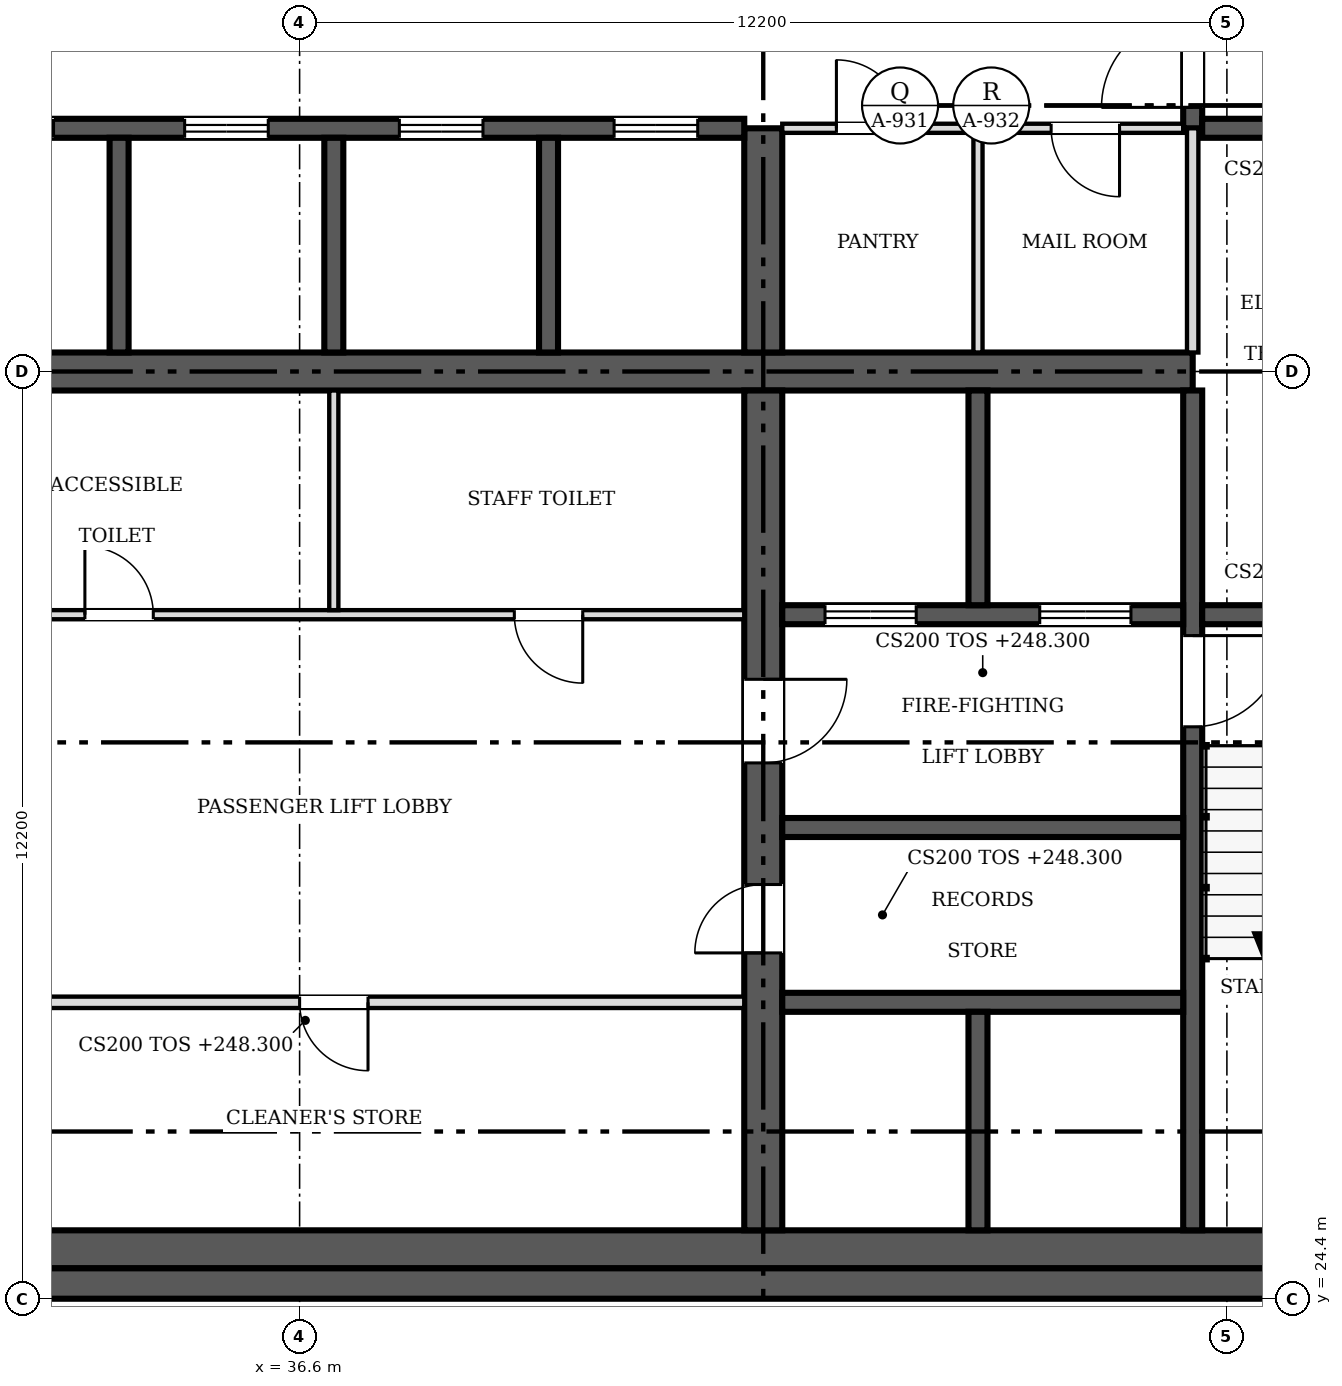
"""IFC4 building model, lengths in metres.
Left out: names, types, materials, properties, quantities, classifications, styles, units other than length and angle.
Written with IfcOpenShell. Run it as: python <this file> out.ifc"""

import sys

from ifc_helpers import new_model, si_unit, direction, frame, frame_2d, origin, place, context, subcontext, project, spatial, rectangle, extrude, source, transform, mapped, element, fill, save


model = new_model("IFC4")
c1 = context("Model", 3, precision=1e-05, world=origin(), true_north=direction((0.0, 1.0)))
c2 = subcontext(c1, "Body", "Model", "MODEL_VIEW")
j1 = project(units=[si_unit("LENGTHUNIT", "METRE"), si_unit("PLANEANGLEUNIT", "RADIAN")], contexts=[c1])
p1 = place(None, origin())
s1 = spatial("IfcSite", under=j1, at=p1, CompositionType="ELEMENT")
p2 = place(p1, origin())
s2 = spatial("IfcBuilding", under=s1, at=p2, CompositionType="ELEMENT")
p3 = place(p2, frame((0.0, 0.0, 248.3)))
s3 = spatial("IfcBuildingStorey", under=s2, at=p3, CompositionType="ELEMENT", Elevation=248.3)
p4 = place(p3, frame((54.9, 24.6, 0.0), z_axis=(0.0, 0.0, 1.0), x_axis=(-1.0, 0.0, 0.0)))
e1 = element("IfcWall", 1, at=p4, inside=s3, PredefinedType="SHEAR", context=c2, shape_type="SweptSolid", body=[
    extrude(rectangle(XDim=24.4, YDim=0.4, at=frame_2d((12.2, 0.0))), origin(), (0.0, 0.0, 1.0), 3.8),
])
m1 = source(origin(), c2, "Body", "SweptSolid", [
    extrude(rectangle(XDim=1.2, YDim=2.1, at=frame_2d((0.6, 1.05))), frame((0.0, 0.21, 0.0), z_axis=(0.0, -1.0, 0.0), x_axis=(1.0, 0.0, 0.0)), (0.0, 0.0, 1.0), 0.42),
])
p5 = place(p4, frame((1.5, 0.0, 0.0)))
e2 = element("IfcOpeningElement", 2, at=p5, cuts=e1, PredefinedType="OPENING", context=c2, shape_type="MappedRepresentation", body=[
    mapped(m1, transform((0.0, 0.0, 0.0), scale=1.0)),
])
p6 = place(p3, frame((30.9, 25.05, 0.0), z_axis=(0.0, 0.0, 1.0), x_axis=(1.0, 0.0, 0.0)))
e3 = element("IfcWall", 3, at=p6, inside=s3, PredefinedType="SOLIDWALL", context=c2, shape_type="SweptSolid", body=[
    extrude(rectangle(XDim=21.3, YDim=0.5, at=frame_2d((10.65, 0.0))), origin(), (0.0, 0.0, 1.0), 3.8),
])
p7 = place(p3, frame((31.4, 36.6, 0.0), z_axis=(0.0, 0.0, 1.0), x_axis=(1.0, 0.0, 0.0)))
e4 = element("IfcWall", 4, at=p7, inside=s3, PredefinedType="SHEAR", context=c2, shape_type="SweptSolid", body=[
    extrude(rectangle(XDim=16.95, YDim=0.5, at=frame_2d((8.475, 0.0))), origin(), (0.0, 0.0, 1.0), 3.8),
])
p8 = place(p3, frame((42.7, 36.35, 0.0), z_axis=(0.0, 0.0, 1.0), x_axis=(0.0, -1.0, 0.0)))
e5 = element("IfcWall", 5, at=p8, inside=s3, PredefinedType="SHEAR", context=c2, shape_type="SweptSolid", body=[
    extrude(rectangle(XDim=11.05, YDim=0.5, at=frame_2d((5.525, 0.0))), origin(), (0.0, 0.0, 1.0), 3.8),
])
m2 = source(origin(), c2, "Body", "SweptSolid", [
    extrude(rectangle(XDim=0.9, YDim=2.1, at=frame_2d((0.45, 1.05))), frame((0.0, 0.26, 0.0), z_axis=(0.0, -1.0, 0.0), x_axis=(1.0, 0.0, 0.0)), (0.0, 0.0, 1.0), 0.52),
])
p9 = place(p8, frame((6.5, 0.0, 0.0)))
e6 = element("IfcOpeningElement", 6, at=p9, cuts=e5, PredefinedType="OPENING", context=c2, shape_type="MappedRepresentation", body=[
    mapped(m2, transform((0.0, 0.0, 0.0), scale=1.0)),
])
m3 = source(origin(), c2, "Body", "SweptSolid", [
    extrude(rectangle(XDim=1.1, YDim=2.1, at=frame_2d((0.55, 1.05))), frame((0.0, 0.26, 0.0), z_axis=(0.0, -1.0, 0.0), x_axis=(1.0, 0.0, 0.0)), (0.0, 0.0, 1.0), 0.52),
])
p10 = place(p8, frame((3.8, 0.0, 0.0)))
e7 = element("IfcOpeningElement", 7, at=p10, cuts=e5, PredefinedType="OPENING", context=c2, shape_type="MappedRepresentation", body=[
    mapped(m3, transform((0.0, 0.0, 0.0), scale=1.0)),
])
p11 = place(p3, frame((42.7, 36.85, 0.0), z_axis=(0.0, 0.0, 1.0), x_axis=(0.0, 1.0, 0.0)))
e8 = element("IfcWall", 8, at=p11, inside=s3, PredefinedType="SHEAR", context=c2, shape_type="SweptSolid", body=[
    extrude(rectangle(XDim=2.95, YDim=0.5, at=frame_2d((1.475, 0.0))), origin(), (0.0, 0.0, 1.0), 3.8),
])
p12 = place(p3, frame((31.4, 39.8, 0.0), z_axis=(0.0, 0.0, 1.0), x_axis=(1.0, 0.0, 0.0)))
e9 = element("IfcWall", 9, at=p12, inside=s3, PredefinedType="SOLIDWALL", context=c2, shape_type="SweptSolid", body=[
    extrude(rectangle(XDim=11.05, YDim=0.25, at=frame_2d((5.525, 0.0))), origin(), (0.0, 0.0, 1.0), 3.8),
])
m4 = source(origin(), c2, "Body", "SweptSolid", [
    extrude(rectangle(XDim=1.1, YDim=2.1, at=frame_2d((0.55, 1.05))), frame((0.0, 0.135, 0.0), z_axis=(0.0, -1.0, 0.0), x_axis=(1.0, 0.0, 0.0)), (0.0, 0.0, 1.0), 0.27),
])
p13 = place(p12, frame((0.863, 0.0, 0.0)))
e10 = element("IfcOpeningElement", 10, at=p13, cuts=e9, PredefinedType="OPENING", context=c2, shape_type="MappedRepresentation", body=[
    mapped(m4, transform((0.0, 0.0, 0.0), scale=1.0)),
])
p14 = place(p12, frame((3.688, 0.0, 0.0)))
e11 = element("IfcOpeningElement", 11, at=p14, cuts=e9, PredefinedType="OPENING", context=c2, shape_type="MappedRepresentation", body=[
    mapped(m4, transform((0.0, 0.0, 0.0), scale=1.0)),
])
p15 = place(p12, frame((6.512, 0.0, 0.0)))
e12 = element("IfcOpeningElement", 12, at=p15, cuts=e9, PredefinedType="OPENING", context=c2, shape_type="MappedRepresentation", body=[
    mapped(m4, transform((0.0, 0.0, 0.0), scale=1.0)),
])
p16 = place(p12, frame((9.337, 0.0, 0.0)))
e13 = element("IfcOpeningElement", 13, at=p16, cuts=e9, PredefinedType="OPENING", context=c2, shape_type="MappedRepresentation", body=[
    mapped(m4, transform((0.0, 0.0, 0.0), scale=1.0)),
])
p17 = place(p3, frame((48.35, 36.35, 0.0), z_axis=(0.0, 0.0, 1.0), x_axis=(0.0, -1.0, 0.0)))
e14 = element("IfcWall", 14, at=p17, inside=s3, PredefinedType="SOLIDWALL", context=c2, shape_type="SweptSolid", body=[
    extrude(rectangle(XDim=11.05, YDim=0.25, at=frame_2d((5.525, 0.0))), origin(), (0.0, 0.0, 1.0), 3.8),
])
m5 = source(origin(), c2, "Body", "SweptSolid", [
    extrude(rectangle(XDim=1.2, YDim=2.1, at=frame_2d((0.6, 1.05))), frame((0.0, 0.135, 0.0), z_axis=(0.0, -1.0, 0.0), x_axis=(1.0, 0.0, 0.0)), (0.0, 0.0, 1.0), 0.27),
])
p18 = place(p17, frame((3.225, 0.0, 0.0)))
e15 = element("IfcOpeningElement", 15, at=p18, cuts=e14, PredefinedType="OPENING", context=c2, shape_type="MappedRepresentation", body=[
    mapped(m5, transform((0.0, 0.0, 0.0), scale=1.0)),
])
p19 = place(p3, frame((48.225, 33.4, 0.0), z_axis=(0.0, 0.0, 1.0), x_axis=(-1.0, 0.0, 0.0)))
e16 = element("IfcWall", 16, at=p19, inside=s3, PredefinedType="SOLIDWALL", context=c2, shape_type="SweptSolid", body=[
    extrude(rectangle(XDim=5.275, YDim=0.25, at=frame_2d((2.638, 0.0))), origin(), (0.0, 0.0, 1.0), 3.8),
])
p20 = place(p19, frame((3.512, 0.0, 0.0)))
e17 = element("IfcOpeningElement", 17, at=p20, cuts=e16, PredefinedType="OPENING", context=c2, shape_type="MappedRepresentation", body=[
    mapped(m5, transform((0.0, 0.0, 0.0), scale=1.0)),
])
p21 = place(p19, frame((0.688, 0.0, 0.0)))
e18 = element("IfcOpeningElement", 18, at=p21, cuts=e16, PredefinedType="OPENING", context=c2, shape_type="MappedRepresentation", body=[
    mapped(m5, transform((0.0, 0.0, 0.0), scale=1.0)),
])
p22 = place(p3, frame((48.475, 33.4, 0.0), z_axis=(0.0, 0.0, 1.0), x_axis=(1.0, 0.0, 0.0)))
e19 = element("IfcWall", 19, at=p22, inside=s3, PredefinedType="SOLIDWALL", context=c2, shape_type="SweptSolid", body=[
    extrude(rectangle(XDim=3.525, YDim=0.25, at=frame_2d((1.762, 0.0))), origin(), (0.0, 0.0, 1.0), 3.8),
])
p23 = place(p3, frame((48.35, 47.9, 0.0), z_axis=(0.0, 0.0, 1.0), x_axis=(0.0, -1.0, 0.0)))
e20 = element("IfcWall", 20, at=p23, inside=s3, PredefinedType="SOLIDWALL", context=c2, shape_type="SweptSolid", body=[
    extrude(rectangle(XDim=8.1, YDim=0.25, at=frame_2d((4.05, 0.0))), origin(), (0.0, 0.0, 1.0), 3.8),
])
p24 = place(p23, frame((6.625, 0.0, 0.0)))
e21 = element("IfcOpeningElement", 21, at=p24, cuts=e20, PredefinedType="OPENING", context=c2, shape_type="MappedRepresentation", body=[
    mapped(m5, transform((0.0, 0.0, 0.0), scale=1.0)),
])
for number, where, z_axis, x_axis in (
    (22, (42.95, 28.3, 0.0), (0.0, 0.0, 1.0), (1.0, 0.0, 0.0)),
    (23, (42.95, 30.6, 0.0), (0.0, 0.0, 1.0), (1.0, 0.0, 0.0)),
):
    element("IfcWall", number, at=place(p3, frame(where, z_axis=z_axis, x_axis=x_axis)), inside=s3, PredefinedType="SOLIDWALL", context=c2, shape_type="SweptSolid", body=[
        extrude(rectangle(XDim=5.275, YDim=0.25, at=frame_2d((2.638, 0.0))), origin(), (0.0, 0.0, 1.0), 3.8),
    ])
p25 = place(p3, frame((48.475, 39.8, 0.0), z_axis=(0.0, 0.0, 1.0), x_axis=(1.0, 0.0, 0.0)))
e24 = element("IfcWall", 24, at=p25, inside=s3, PredefinedType="SOLIDWALL", context=c2, shape_type="SweptSolid", body=[
    extrude(rectangle(XDim=3.4, YDim=0.25, at=frame_2d((1.7, 0.0))), origin(), (0.0, 0.0, 1.0), 3.8),
])
for number, where, z_axis, x_axis in (
    (25, (34.225, 36.85, 0.0), (0.0, 0.0, 1.0), (0.0, 1.0, 0.0)),
    (26, (37.05, 36.85, 0.0), (0.0, 0.0, 1.0), (0.0, 1.0, 0.0)),
    (27, (39.875, 36.85, 0.0), (0.0, 0.0, 1.0), (0.0, 1.0, 0.0)),
):
    element("IfcWall", number, at=place(p3, frame(where, z_axis=z_axis, x_axis=x_axis)), inside=s3, PredefinedType="SOLIDWALL", context=c2, shape_type="SweptSolid", body=[
        extrude(rectangle(XDim=2.825, YDim=0.25, at=frame_2d((1.413, 0.0))), origin(), (0.0, 0.0, 1.0), 3.8),
    ])
p26 = place(p3, frame((45.525, 33.525, 0.0), z_axis=(0.0, 0.0, 1.0), x_axis=(0.0, 1.0, 0.0)))
e28 = element("IfcWall", 28, at=p26, inside=s3, PredefinedType="SOLIDWALL", context=c2, shape_type="SweptSolid", body=[
    extrude(rectangle(XDim=2.825, YDim=0.25, at=frame_2d((1.413, 0.0))), origin(), (0.0, 0.0, 1.0), 3.8),
])
p27 = place(p3, frame((45.525, 25.3, 0.0), z_axis=(0.0, 0.0, 1.0), x_axis=(0.0, 1.0, 0.0)))
e29 = element("IfcWall", 29, at=p27, inside=s3, PredefinedType="SOLIDWALL", context=c2, shape_type="SweptSolid", body=[
    extrude(rectangle(XDim=2.875, YDim=0.25, at=frame_2d((1.438, 0.0))), origin(), (0.0, 0.0, 1.0), 3.8),
])
p28 = place(p3, frame((42.45, 28.3, 0.0), z_axis=(0.0, 0.0, 1.0), x_axis=(-1.0, 0.0, 0.0)))
e30 = element("IfcWall", 30, at=p28, inside=s3, PredefinedType="PARTITIONING", context=c2, shape_type="SweptSolid", body=[
    extrude(rectangle(XDim=11.05, YDim=0.15, at=frame_2d((5.525, 0.0))), origin(), (0.0, 0.0, 1.0), 3.6),
])
m6 = source(origin(), c2, "Body", "SweptSolid", [
    extrude(rectangle(XDim=0.9, YDim=2.1, at=frame_2d((0.45, 1.05))), frame((0.0, 0.085, 0.0), z_axis=(0.0, -1.0, 0.0), x_axis=(1.0, 0.0, 0.0)), (0.0, 0.0, 1.0), 0.17),
])
p29 = place(p28, frame((4.95, 0.0, 0.0)))
e31 = element("IfcOpeningElement", 31, at=p29, cuts=e30, PredefinedType="OPENING", context=c2, shape_type="MappedRepresentation", body=[
    mapped(m6, transform((0.0, 0.0, 0.0), scale=1.0)),
])
p30 = place(p3, frame((31.4, 33.4, 0.0), z_axis=(0.0, 0.0, 1.0), x_axis=(1.0, 0.0, 0.0)))
e32 = element("IfcWall", 32, at=p30, inside=s3, PredefinedType="PARTITIONING", context=c2, shape_type="SweptSolid", body=[
    extrude(rectangle(XDim=11.05, YDim=0.12, at=frame_2d((5.525, 0.0))), origin(), (0.0, 0.0, 1.0), 3.6),
])
m7 = source(origin(), c2, "Body", "SweptSolid", [
    extrude(rectangle(XDim=0.9, YDim=2.1, at=frame_2d((0.45, 1.05))), frame((0.0, 0.07, 0.0), z_axis=(0.0, -1.0, 0.0), x_axis=(1.0, 0.0, 0.0)), (0.0, 0.0, 1.0), 0.14),
])
p31 = place(p30, frame((2.375, 0.0, 0.0)))
e33 = element("IfcOpeningElement", 33, at=p31, cuts=e32, PredefinedType="OPENING", context=c2, shape_type="MappedRepresentation", body=[
    mapped(m7, transform((0.0, 0.0, 0.0), scale=1.0)),
])
p32 = place(p30, frame((8.025, 0.0, 0.0)))
e34 = element("IfcOpeningElement", 34, at=p32, cuts=e32, PredefinedType="OPENING", context=c2, shape_type="MappedRepresentation", body=[
    mapped(m7, transform((0.0, 0.0, 0.0), scale=1.0)),
])
p33 = place(p3, frame((48.225, 39.8, 0.0), z_axis=(0.0, 0.0, 1.0), x_axis=(-1.0, 0.0, 0.0)))
e35 = element("IfcWall", 35, at=p33, inside=s3, PredefinedType="PARTITIONING", context=c2, shape_type="SweptSolid", body=[
    extrude(rectangle(XDim=5.275, YDim=0.12, at=frame_2d((2.638, 0.0))), origin(), (0.0, 0.0, 1.0), 3.6),
])
p34 = place(p33, frame((3.663, 0.0, 0.0)))
e36 = element("IfcOpeningElement", 36, at=p34, cuts=e35, PredefinedType="OPENING", context=c2, shape_type="MappedRepresentation", body=[
    mapped(m7, transform((0.0, 0.0, 0.0), scale=1.0)),
])
p35 = place(p33, frame((0.837, 0.0, 0.0)))
e37 = element("IfcOpeningElement", 37, at=p35, cuts=e35, PredefinedType="OPENING", context=c2, shape_type="MappedRepresentation", body=[
    mapped(m7, transform((0.0, 0.0, 0.0), scale=1.0)),
])
p36 = place(p3, frame((45.525, 36.85, 0.0), z_axis=(0.0, 0.0, 1.0), x_axis=(0.0, 1.0, 0.0)))
e38 = element("IfcWall", 38, at=p36, inside=s3, PredefinedType="PARTITIONING", context=c2, shape_type="SweptSolid", body=[
    extrude(rectangle(XDim=2.89, YDim=0.12, at=frame_2d((1.445, 0.0))), origin(), (0.0, 0.0, 1.0), 3.6),
])
p37 = place(p3, frame((48.35, 36.85, 0.0), z_axis=(0.0, 0.0, 1.0), x_axis=(0.0, 1.0, 0.0)))
e39 = element("IfcWall", 39, at=p37, inside=s3, PredefinedType="PARTITIONING", context=c2, shape_type="SweptSolid", body=[
    extrude(rectangle(XDim=2.95, YDim=0.15, at=frame_2d((1.475, 0.0))), origin(), (0.0, 0.0, 1.0), 3.6),
])
p38 = place(p3, frame((37.05, 33.46, 0.0), z_axis=(0.0, 0.0, 1.0), x_axis=(0.0, 1.0, 0.0)))
e40 = element("IfcWall", 40, at=p38, inside=s3, PredefinedType="PARTITIONING", context=c2, shape_type="SweptSolid", body=[
    extrude(rectangle(XDim=2.89, YDim=0.12, at=frame_2d((1.445, 0.0))), origin(), (0.0, 0.0, 1.0), 3.6),
])
m8 = source(origin(), c2, "Body", "SweptSolid", [
    extrude(rectangle(XDim=0.9, YDim=2.1, at=frame_2d((0.45, 1.05))), frame((0.0, 0.025, 0.0), z_axis=(0.0, -1.0, 0.0), x_axis=(1.0, 0.0, 0.0)), (0.0, 0.0, 1.0), 0.05),
])
p39 = place(p9, origin())
e41 = element("IfcDoor", 41, at=p39, inside=s3, OperationType="SINGLE_SWING_RIGHT", PredefinedType="DOOR", context=c2, shape_type="MappedRepresentation", body=[
    mapped(m8, transform((0.0, 0.0, 0.0), scale=1.0)),
])
fill(e6, e41)
m9 = source(origin(), c2, "Body", "SweptSolid", [
    extrude(rectangle(XDim=1.1, YDim=2.1, at=frame_2d((0.55, 1.05))), frame((0.0, 0.025, 0.0), z_axis=(0.0, -1.0, 0.0), x_axis=(1.0, 0.0, 0.0)), (0.0, 0.0, 1.0), 0.05),
])
p40 = place(p10, origin())
e42 = element("IfcDoor", 42, at=p40, inside=s3, OperationType="SINGLE_SWING_LEFT", PredefinedType="DOOR", context=c2, shape_type="MappedRepresentation", body=[
    mapped(m9, transform((0.0, 0.0, 0.0), scale=1.0)),
])
fill(e7, e42)
p41 = place(p13, origin())
e43 = element("IfcDoor", 43, at=p41, inside=s3, OperationType="DOUBLE_DOOR_SLIDING", PredefinedType="DOOR", context=c2, shape_type="MappedRepresentation", body=[
    mapped(m9, transform((0.0, 0.0, 0.0), scale=1.0)),
])
fill(e10, e43)
p42 = place(p14, origin())
e44 = element("IfcDoor", 44, at=p42, inside=s3, OperationType="DOUBLE_DOOR_SLIDING", PredefinedType="DOOR", context=c2, shape_type="MappedRepresentation", body=[
    mapped(m9, transform((0.0, 0.0, 0.0), scale=1.0)),
])
fill(e11, e44)
p43 = place(p15, origin())
e45 = element("IfcDoor", 45, at=p43, inside=s3, OperationType="DOUBLE_DOOR_SLIDING", PredefinedType="DOOR", context=c2, shape_type="MappedRepresentation", body=[
    mapped(m9, transform((0.0, 0.0, 0.0), scale=1.0)),
])
fill(e12, e45)
p44 = place(p16, origin())
e46 = element("IfcDoor", 46, at=p44, inside=s3, OperationType="DOUBLE_DOOR_SLIDING", PredefinedType="DOOR", context=c2, shape_type="MappedRepresentation", body=[
    mapped(m9, transform((0.0, 0.0, 0.0), scale=1.0)),
])
fill(e13, e46)
m10 = source(origin(), c2, "Body", "SweptSolid", [
    extrude(rectangle(XDim=1.2, YDim=2.1, at=frame_2d((0.6, 1.05))), frame((0.0, 0.025, 0.0), z_axis=(0.0, -1.0, 0.0), x_axis=(1.0, 0.0, 0.0)), (0.0, 0.0, 1.0), 0.05),
])
p45 = place(p18, origin())
e47 = element("IfcDoor", 47, at=p45, inside=s3, OperationType="SINGLE_SWING_LEFT", PredefinedType="DOOR", context=c2, shape_type="MappedRepresentation", body=[
    mapped(m10, transform((0.0, 0.0, 0.0), scale=1.0)),
])
fill(e15, e47)
p46 = place(p20, origin())
e48 = element("IfcDoor", 48, at=p46, inside=s3, OperationType="DOUBLE_DOOR_SLIDING", PredefinedType="DOOR", context=c2, shape_type="MappedRepresentation", body=[
    mapped(m10, transform((0.0, 0.0, 0.0), scale=1.0)),
])
fill(e17, e48)
p47 = place(p21, origin())
e49 = element("IfcDoor", 49, at=p47, inside=s3, OperationType="DOUBLE_DOOR_SLIDING", PredefinedType="DOOR", context=c2, shape_type="MappedRepresentation", body=[
    mapped(m10, transform((0.0, 0.0, 0.0), scale=1.0)),
])
fill(e18, e49)
p48 = place(p24, origin())
e50 = element("IfcDoor", 50, at=p48, inside=s3, OperationType="SINGLE_SWING_RIGHT", PredefinedType="DOOR", context=c2, shape_type="MappedRepresentation", body=[
    mapped(m10, transform((0.0, 0.0, 0.0), scale=1.0)),
])
fill(e21, e50)
p49 = place(p29, origin())
e51 = element("IfcDoor", 51, at=p49, inside=s3, OperationType="SINGLE_SWING_LEFT", PredefinedType="DOOR", context=c2, shape_type="MappedRepresentation", body=[
    mapped(m8, transform((0.0, 0.0, 0.0), scale=1.0)),
])
fill(e31, e51)
p50 = place(p31, origin())
e52 = element("IfcDoor", 52, at=p50, inside=s3, OperationType="SINGLE_SWING_LEFT", PredefinedType="DOOR", context=c2, shape_type="MappedRepresentation", body=[
    mapped(m8, transform((0.0, 0.0, 0.0), scale=1.0)),
])
fill(e33, e52)
p51 = place(p32, origin())
e53 = element("IfcDoor", 53, at=p51, inside=s3, OperationType="SINGLE_SWING_RIGHT", PredefinedType="DOOR", context=c2, shape_type="MappedRepresentation", body=[
    mapped(m8, transform((0.0, 0.0, 0.0), scale=1.0)),
])
fill(e34, e53)
p52 = place(p34, origin())
e54 = element("IfcDoor", 54, at=p52, inside=s3, OperationType="SINGLE_SWING_RIGHT", PredefinedType="DOOR", context=c2, shape_type="MappedRepresentation", body=[
    mapped(m8, transform((0.0, 0.0, 0.0), scale=1.0)),
])
fill(e36, e54)
p53 = place(p35, origin())
e55 = element("IfcDoor", 55, at=p53, inside=s3, OperationType="SINGLE_SWING_LEFT", PredefinedType="DOOR", context=c2, shape_type="MappedRepresentation", body=[
    mapped(m8, transform((0.0, 0.0, 0.0), scale=1.0)),
])
fill(e37, e55)
save(model, sys.argv[1])
